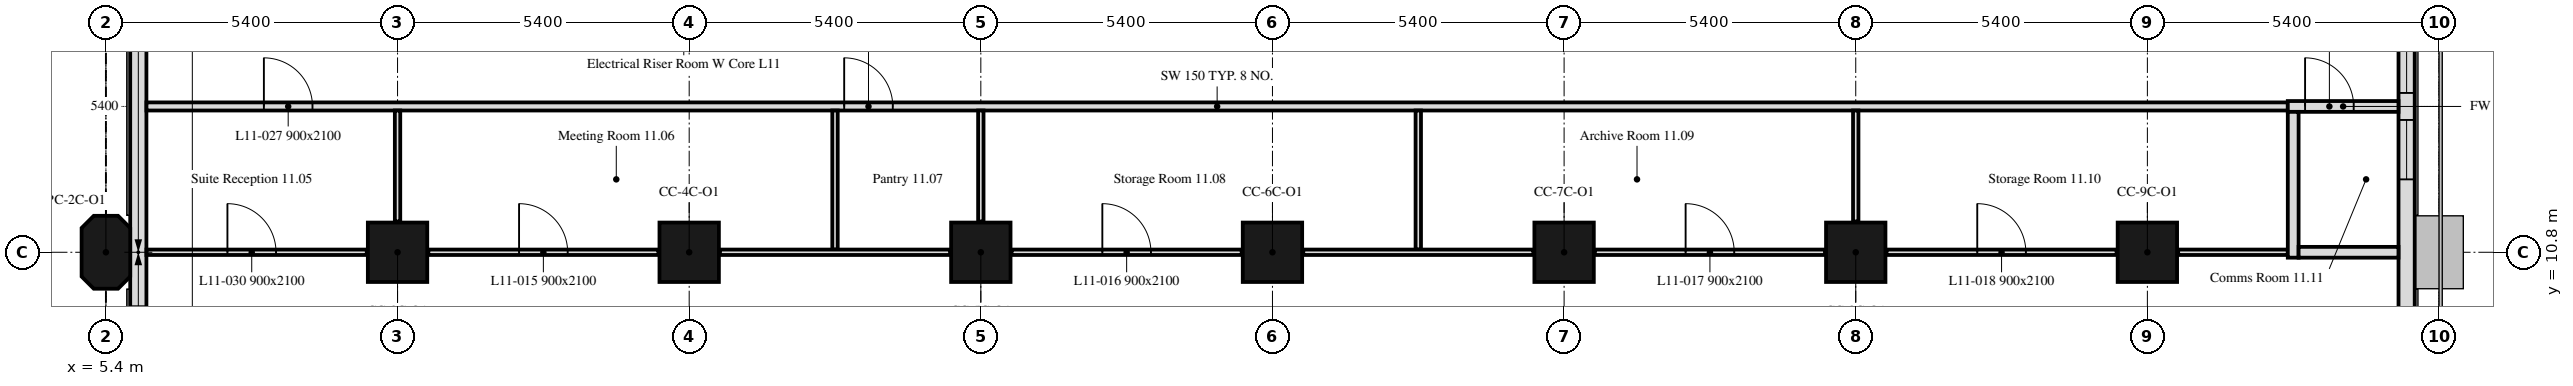
"""IFC4 building model, lengths in metres.
Left out: names, types, materials, properties, quantities, classifications, styles, units other than length and angle.
Written with IfcOpenShell. Run it as: python <this file> out.ifc"""

import sys

from ifc_helpers import new_model, si_unit, direction, frame, frame_2d, origin, origin_2d, place, context, subcontext, project, spatial, polyline, rectangle, outline, extrude, element, fill, save


model = new_model("IFC4")
c1 = context("Model", 3, precision=1e-05, world=origin(), true_north=direction((0.0, 1.0)))
c2 = subcontext(c1, "Body", "Model", "MODEL_VIEW")
j1 = project(units=[si_unit("LENGTHUNIT", "METRE"), si_unit("PLANEANGLEUNIT", "RADIAN")], contexts=[c1])
p1 = place(None, origin())
s1 = spatial("IfcSite", under=j1, at=p1, CompositionType="ELEMENT")
p2 = place(p1, origin())
s2 = spatial("IfcBuilding", under=s1, at=p2, CompositionType="ELEMENT")
p3 = place(p2, frame((0.0, 0.0, 52.6)))
s3 = spatial("IfcBuildingStorey", under=s2, at=p3, CompositionType="ELEMENT", Elevation=52.6)
p4 = place(p3, frame((5.4, 10.8, 0.0), z_axis=(0.0, 0.0, 1.0), x_axis=(0.0, 1.0, 0.0)))
e1 = element("IfcColumn", 1, at=p4, inside=s3, PredefinedType="COLUMN", context=c2, shape_type="SweptSolid", body=[
    extrude(outline(polyline([(-0.45, -0.45), (0.45, -0.45), (0.675, -0.225), (0.675, 0.225), (0.45, 0.45), (-0.45, 0.45), (-0.675, 0.225), (-0.675, -0.225), (-0.45, -0.45)])), origin(), (0.0, 0.0, 1.0), 3.5),
])
for number, where, z_axis, x_axis in (
    (2, (10.8, 10.8, 0.0), (0.0, 0.0, 1.0), (1.0, 0.0, 0.0)),
    (3, (16.2, 10.8, 0.0), (0.0, 0.0, 1.0), (1.0, 0.0, 0.0)),
    (4, (21.6, 10.8, 0.0), (0.0, 0.0, 1.0), (1.0, 0.0, 0.0)),
    (5, (27.0, 10.8, 0.0), (0.0, 0.0, 1.0), (1.0, 0.0, 0.0)),
    (6, (32.4, 10.8, 0.0), (0.0, 0.0, 1.0), (1.0, 0.0, 0.0)),
    (7, (37.8, 10.8, 0.0), (0.0, 0.0, 1.0), (1.0, 0.0, 0.0)),
    (8, (43.2, 10.8, 0.0), (0.0, 0.0, 1.0), (1.0, 0.0, 0.0)),
):
    element("IfcColumn", number, at=place(p3, frame(where, z_axis=z_axis, x_axis=x_axis)), inside=s3, PredefinedType="COLUMN", context=c2, shape_type="SweptSolid", body=[
        extrude(rectangle(XDim=1.1, YDim=1.1, at=origin_2d()), origin(), (0.0, 0.0, 1.0), 3.5),
    ])
p5 = place(p3, frame((48.0, 5.586, 0.0), z_axis=(0.0, 0.0, 1.0), x_axis=(0.0, 1.0, 0.0)))
e9 = element("IfcWall", 9, at=p5, inside=s3, PredefinedType="SOLIDWALL", context=c2, shape_type="SweptSolid", body=[
    extrude(rectangle(XDim=32.027, YDim=0.3, at=frame_2d((16.014, 0.0))), origin(), (0.0, 0.0, 1.0), 3.5),
])
p6 = place(p5, frame((6.564, 0.0, 0.9)))
e10 = element("IfcOpeningElement", 10, at=p6, cuts=e9, PredefinedType="OPENING", context=c2, shape_type="SweptSolid", body=[
    extrude(rectangle(XDim=1.1, YDim=1.7, at=frame_2d((0.55, 0.85))), frame((0.0, 0.16, 0.0), z_axis=(0.0, -1.0, 0.0), x_axis=(1.0, 0.0, 0.0)), (0.0, 0.0, 1.0), 0.32),
])
p7 = place(p5, frame((8.164, 0.0, 0.9)))
e11 = element("IfcOpeningElement", 11, at=p7, cuts=e9, PredefinedType="OPENING", context=c2, shape_type="SweptSolid", body=[
    extrude(rectangle(XDim=1.1, YDim=1.7, at=frame_2d((0.55, 0.85))), frame((0.0, 0.16, 0.0), z_axis=(0.0, -1.0, 0.0), x_axis=(1.0, 0.0, 0.0)), (0.0, 0.0, 1.0), 0.32),
])
p8 = place(p5, frame((17.014, 0.0, 0.9)))
e12 = element("IfcOpeningElement", 12, at=p8, cuts=e9, PredefinedType="OPENING", context=c2, shape_type="SweptSolid", body=[
    extrude(rectangle(XDim=3.4, YDim=1.7, at=frame_2d((1.7, 0.85))), frame((0.0, 0.16, 0.0), z_axis=(0.0, -1.0, 0.0), x_axis=(1.0, 0.0, 0.0)), (0.0, 0.0, 1.0), 0.32),
])
p9 = place(p5, frame((28.164, 0.0, 0.9)))
e13 = element("IfcOpeningElement", 13, at=p9, cuts=e9, PredefinedType="OPENING", context=c2, shape_type="SweptSolid", body=[
    extrude(rectangle(XDim=1.1, YDim=1.7, at=frame_2d((0.55, 0.85))), frame((0.0, 0.16, 0.0), z_axis=(0.0, -1.0, 0.0), x_axis=(1.0, 0.0, 0.0)), (0.0, 0.0, 1.0), 0.32),
])
p10 = place(p5, frame((29.764, 0.0, 0.9)))
e14 = element("IfcOpeningElement", 14, at=p10, cuts=e9, PredefinedType="OPENING", context=c2, shape_type="SweptSolid", body=[
    extrude(rectangle(XDim=1.1, YDim=1.7, at=frame_2d((0.55, 0.85))), frame((0.0, 0.16, 0.0), z_axis=(0.0, -1.0, 0.0), x_axis=(1.0, 0.0, 0.0)), (0.0, 0.0, 1.0), 0.32),
])
p11 = place(p3, frame((6.0, 16.2, 0.0), z_axis=(0.0, 0.0, 1.0), x_axis=(0.0, -1.0, 0.0)))
e15 = element("IfcWall", 15, at=p11, inside=s3, PredefinedType="SOLIDWALL", context=c2, shape_type="SweptSolid", body=[
    extrude(rectangle(XDim=10.614, YDim=0.3, at=frame_2d((5.307, 0.0))), origin(), (0.0, 0.0, 1.0), 3.5),
])
p12 = place(p11, frame((6.4, 0.0, 0.9)))
e16 = element("IfcOpeningElement", 16, at=p12, cuts=e15, PredefinedType="OPENING", context=c2, shape_type="SweptSolid", body=[
    extrude(rectangle(XDim=3.4, YDim=1.7, at=frame_2d((1.7, 0.85))), frame((0.0, 0.16, 0.0), z_axis=(0.0, -1.0, 0.0), x_axis=(1.0, 0.0, 0.0)), (0.0, 0.0, 1.0), 0.32),
])
p13 = place(p3, frame((6.151, 13.5, 0.0), z_axis=(0.0, 0.0, 1.0), x_axis=(1.0, 0.0, 0.0)))
e17 = element("IfcWall", 17, at=p13, inside=s3, PredefinedType="PARTITIONING", context=c2, shape_type="SweptSolid", body=[
    extrude(rectangle(XDim=39.649, YDim=0.15, at=frame_2d((19.825, 0.0))), origin(), (0.0, 0.0, 1.0), 2.75),
])
p14 = place(p13, frame((12.919, 0.0, 0.0)))
e18 = element("IfcOpeningElement", 18, at=p14, cuts=e17, PredefinedType="OPENING", context=c2, shape_type="SweptSolid", body=[
    extrude(rectangle(XDim=0.9, YDim=2.1, at=frame_2d((0.45, 1.05))), frame((0.0, 0.075, 0.0), z_axis=(0.0, -1.0, 0.0), x_axis=(1.0, 0.0, 0.0)), (0.0, 0.0, 1.0), 0.15),
])
p15 = place(p13, frame((2.174, 0.0, 0.0)))
e19 = element("IfcOpeningElement", 19, at=p15, cuts=e17, PredefinedType="OPENING", context=c2, shape_type="SweptSolid", body=[
    extrude(rectangle(XDim=0.9, YDim=2.1, at=frame_2d((0.45, 1.05))), frame((0.0, 0.075, 0.0), z_axis=(0.0, -1.0, 0.0), x_axis=(1.0, 0.0, 0.0)), (0.0, 0.0, 1.0), 0.15),
])
p16 = place(p3, frame((45.8, 13.5, 0.0), z_axis=(0.0, 0.0, 1.0), x_axis=(1.0, 0.0, 0.0)))
e20 = element("IfcWall", 20, at=p16, inside=s3, PredefinedType="PARTITIONING", context=c2, shape_type="SweptSolid", body=[
    extrude(rectangle(XDim=2.049, YDim=0.2, at=frame_2d((1.024, 0.0))), origin(), (0.0, 0.0, 1.0), 3.5),
])
p17 = place(p16, frame((0.32, 0.0, 0.0)))
e21 = element("IfcOpeningElement", 21, at=p17, cuts=e20, PredefinedType="OPENING", context=c2, shape_type="SweptSolid", body=[
    extrude(rectangle(XDim=0.9, YDim=2.1, at=frame_2d((0.45, 1.05))), frame((0.0, 0.1, 0.0), z_axis=(0.0, -1.0, 0.0), x_axis=(1.0, 0.0, 0.0)), (0.0, 0.0, 1.0), 0.2),
])
p18 = place(p3, frame((6.151, 10.8, 0.0), z_axis=(0.0, 0.0, 1.0), x_axis=(1.0, 0.0, 0.0)))
e22 = element("IfcWall", 22, at=p18, inside=s3, PredefinedType="PARTITIONING", context=c2, shape_type="SweptSolid", body=[
    extrude(rectangle(XDim=4.079, YDim=0.1, at=frame_2d((2.04, 0.0))), origin(), (0.0, 0.0, 1.0), 3.5),
])
p19 = place(p18, frame((1.499, 0.0, 0.0)))
e23 = element("IfcOpeningElement", 23, at=p19, cuts=e22, PredefinedType="OPENING", context=c2, shape_type="SweptSolid", body=[
    extrude(rectangle(XDim=0.9, YDim=2.1, at=frame_2d((0.45, 1.05))), frame((0.0, 0.05, 0.0), z_axis=(0.0, -1.0, 0.0), x_axis=(1.0, 0.0, 0.0)), (0.0, 0.0, 1.0), 0.1),
])
p20 = place(p3, frame((10.8, 11.37, 0.0), z_axis=(0.0, 0.0, 1.0), x_axis=(0.0, 1.0, 0.0)))
e24 = element("IfcWall", 24, at=p20, inside=s3, PredefinedType="PARTITIONING", context=c2, shape_type="SweptSolid", body=[
    extrude(rectangle(XDim=2.055, YDim=0.1, at=frame_2d((1.027, 0.0))), origin(), (0.0, 0.0, 1.0), 3.5),
])
p21 = place(p3, frame((11.37, 10.8, 0.0), z_axis=(0.0, 0.0, 1.0), x_axis=(1.0, 0.0, 0.0)))
e25 = element("IfcWall", 25, at=p21, inside=s3, PredefinedType="PARTITIONING", context=c2, shape_type="SweptSolid", body=[
    extrude(rectangle(XDim=4.26, YDim=0.1, at=frame_2d((2.13, 0.0))), origin(), (0.0, 0.0, 1.0), 3.5),
])
p22 = place(p21, frame((1.68, 0.0, 0.0)))
e26 = element("IfcOpeningElement", 26, at=p22, cuts=e25, PredefinedType="OPENING", context=c2, shape_type="SweptSolid", body=[
    extrude(rectangle(XDim=0.9, YDim=2.1, at=frame_2d((0.45, 1.05))), frame((0.0, 0.05, 0.0), z_axis=(0.0, -1.0, 0.0), x_axis=(1.0, 0.0, 0.0)), (0.0, 0.0, 1.0), 0.1),
])
p23 = place(p3, frame((18.9, 10.85, 0.0), z_axis=(0.0, 0.0, 1.0), x_axis=(0.0, 1.0, 0.0)))
e27 = element("IfcWall", 27, at=p23, inside=s3, PredefinedType="PARTITIONING", context=c2, shape_type="SweptSolid", body=[
    extrude(rectangle(XDim=2.575, YDim=0.1, at=frame_2d((1.288, 0.0))), origin(), (0.0, 0.0, 1.0), 3.5),
])
p24 = place(p3, frame((16.77, 10.8, 0.0), z_axis=(0.0, 0.0, 1.0), x_axis=(1.0, 0.0, 0.0)))
e28 = element("IfcWall", 28, at=p24, inside=s3, PredefinedType="PARTITIONING", context=c2, shape_type="SweptSolid", body=[
    extrude(rectangle(XDim=4.26, YDim=0.1, at=frame_2d((2.13, 0.0))), origin(), (0.0, 0.0, 1.0), 3.5),
])
p25 = place(p3, frame((21.6, 11.37, 0.0), z_axis=(0.0, 0.0, 1.0), x_axis=(0.0, 1.0, 0.0)))
e29 = element("IfcWall", 29, at=p25, inside=s3, PredefinedType="PARTITIONING", context=c2, shape_type="SweptSolid", body=[
    extrude(rectangle(XDim=2.055, YDim=0.1, at=frame_2d((1.027, 0.0))), origin(), (0.0, 0.0, 1.0), 2.75),
])
p26 = place(p3, frame((22.17, 10.8, 0.0), z_axis=(0.0, 0.0, 1.0), x_axis=(1.0, 0.0, 0.0)))
e30 = element("IfcWall", 30, at=p26, inside=s3, PredefinedType="PARTITIONING", context=c2, shape_type="SweptSolid", body=[
    extrude(rectangle(XDim=4.26, YDim=0.1, at=frame_2d((2.13, 0.0))), origin(), (0.0, 0.0, 1.0), 3.5),
])
p27 = place(p26, frame((1.68, 0.0, 0.0)))
e31 = element("IfcOpeningElement", 31, at=p27, cuts=e30, PredefinedType="OPENING", context=c2, shape_type="SweptSolid", body=[
    extrude(rectangle(XDim=0.9, YDim=2.1, at=frame_2d((0.45, 1.05))), frame((0.0, 0.05, 0.0), z_axis=(0.0, -1.0, 0.0), x_axis=(1.0, 0.0, 0.0)), (0.0, 0.0, 1.0), 0.1),
])
p28 = place(p3, frame((29.7, 10.85, 0.0), z_axis=(0.0, 0.0, 1.0), x_axis=(0.0, 1.0, 0.0)))
e32 = element("IfcWall", 32, at=p28, inside=s3, PredefinedType="PARTITIONING", context=c2, shape_type="SweptSolid", body=[
    extrude(rectangle(XDim=2.575, YDim=0.1, at=frame_2d((1.288, 0.0))), origin(), (0.0, 0.0, 1.0), 3.5),
])
p29 = place(p3, frame((27.57, 10.8, 0.0), z_axis=(0.0, 0.0, 1.0), x_axis=(1.0, 0.0, 0.0)))
e33 = element("IfcWall", 33, at=p29, inside=s3, PredefinedType="PARTITIONING", context=c2, shape_type="SweptSolid", body=[
    extrude(rectangle(XDim=4.26, YDim=0.1, at=frame_2d((2.13, 0.0))), origin(), (0.0, 0.0, 1.0), 3.5),
])
p30 = place(p3, frame((32.97, 10.8, 0.0), z_axis=(0.0, 0.0, 1.0), x_axis=(1.0, 0.0, 0.0)))
e34 = element("IfcWall", 34, at=p30, inside=s3, PredefinedType="PARTITIONING", context=c2, shape_type="SweptSolid", body=[
    extrude(rectangle(XDim=4.26, YDim=0.1, at=frame_2d((2.13, 0.0))), origin(), (0.0, 0.0, 1.0), 2.75),
])
p31 = place(p30, frame((1.68, 0.0, 0.0)))
e35 = element("IfcOpeningElement", 35, at=p31, cuts=e34, PredefinedType="OPENING", context=c2, shape_type="SweptSolid", body=[
    extrude(rectangle(XDim=0.9, YDim=2.1, at=frame_2d((0.45, 1.05))), frame((0.0, 0.05, 0.0), z_axis=(0.0, -1.0, 0.0), x_axis=(1.0, 0.0, 0.0)), (0.0, 0.0, 1.0), 0.1),
])
p32 = place(p3, frame((37.8, 11.37, 0.0), z_axis=(0.0, 0.0, 1.0), x_axis=(0.0, 1.0, 0.0)))
e36 = element("IfcWall", 36, at=p32, inside=s3, PredefinedType="PARTITIONING", context=c2, shape_type="SweptSolid", body=[
    extrude(rectangle(XDim=2.055, YDim=0.1, at=frame_2d((1.027, 0.0))), origin(), (0.0, 0.0, 1.0), 2.75),
])
p33 = place(p3, frame((38.37, 10.8, 0.0), z_axis=(0.0, 0.0, 1.0), x_axis=(1.0, 0.0, 0.0)))
e37 = element("IfcWall", 37, at=p33, inside=s3, PredefinedType="PARTITIONING", context=c2, shape_type="SweptSolid", body=[
    extrude(rectangle(XDim=4.26, YDim=0.1, at=frame_2d((2.13, 0.0))), origin(), (0.0, 0.0, 1.0), 2.75),
])
p34 = place(p33, frame((1.68, 0.0, 0.0)))
e38 = element("IfcOpeningElement", 38, at=p34, cuts=e37, PredefinedType="OPENING", context=c2, shape_type="SweptSolid", body=[
    extrude(rectangle(XDim=0.9, YDim=2.1, at=frame_2d((0.45, 1.05))), frame((0.0, 0.05, 0.0), z_axis=(0.0, -1.0, 0.0), x_axis=(1.0, 0.0, 0.0)), (0.0, 0.0, 1.0), 0.1),
])
p35 = place(p3, frame((43.77, 10.8, 0.0), z_axis=(0.0, 0.0, 1.0), x_axis=(1.0, 0.0, 0.0)))
e39 = element("IfcWall", 39, at=p35, inside=s3, PredefinedType="PARTITIONING", context=c2, shape_type="SweptSolid", body=[
    extrude(rectangle(XDim=2.03, YDim=0.1, at=frame_2d((1.015, 0.0))), origin(), (0.0, 0.0, 1.0), 2.75),
])
p36 = place(p3, frame((45.9, 10.7, 0.0), z_axis=(0.0, 0.0, 1.0), x_axis=(0.0, 1.0, 0.0)))
e40 = element("IfcWall", 40, at=p36, inside=s3, PredefinedType="PARTITIONING", context=c2, shape_type="SweptSolid", body=[
    extrude(rectangle(XDim=2.7, YDim=0.2, at=frame_2d((1.35, 0.0))), origin(), (0.0, 0.0, 1.0), 2.75),
])
p37 = place(p3, frame((46.0, 10.8, 0.0), z_axis=(0.0, 0.0, 1.0), x_axis=(1.0, 0.0, 0.0)))
e41 = element("IfcWall", 41, at=p37, inside=s3, PredefinedType="PARTITIONING", context=c2, shape_type="SweptSolid", body=[
    extrude(rectangle(XDim=1.849, YDim=0.2, at=frame_2d((0.925, 0.0))), origin(), (0.0, 0.0, 1.0), 2.75),
])
p38 = place(p6, origin())
e42 = element("IfcWindow", 42, at=p38, inside=s3, PartitioningType="SINGLE_PANEL", PredefinedType="WINDOW", context=c2, shape_type="SweptSolid", body=[
    extrude(rectangle(XDim=1.1, YDim=1.7, at=frame_2d((0.55, 0.85))), frame((0.0, 0.03, 0.0), z_axis=(0.0, -1.0, 0.0), x_axis=(1.0, 0.0, 0.0)), (0.0, 0.0, 1.0), 0.06),
])
fill(e10, e42)
p39 = place(p7, origin())
e43 = element("IfcWindow", 43, at=p39, inside=s3, PartitioningType="SINGLE_PANEL", PredefinedType="WINDOW", context=c2, shape_type="SweptSolid", body=[
    extrude(rectangle(XDim=1.1, YDim=1.7, at=frame_2d((0.55, 0.85))), frame((0.0, 0.03, 0.0), z_axis=(0.0, -1.0, 0.0), x_axis=(1.0, 0.0, 0.0)), (0.0, 0.0, 1.0), 0.06),
])
fill(e11, e43)
p40 = place(p14, origin())
e44 = element("IfcDoor", 44, at=p40, inside=s3, OperationType="SINGLE_SWING_LEFT", PredefinedType="DOOR", context=c2, shape_type="SweptSolid", body=[
    extrude(rectangle(XDim=0.9, YDim=2.1, at=frame_2d((0.45, 1.05))), frame((0.0, 0.025, 0.0), z_axis=(0.0, -1.0, 0.0), x_axis=(1.0, 0.0, 0.0)), (0.0, 0.0, 1.0), 0.05),
])
fill(e18, e44)
p41 = place(p17, origin())
e45 = element("IfcDoor", 45, at=p41, inside=s3, OperationType="SINGLE_SWING_RIGHT", PredefinedType="DOOR", context=c2, shape_type="SweptSolid", body=[
    extrude(rectangle(XDim=0.9, YDim=2.1, at=frame_2d((0.45, 1.05))), frame((0.0, 0.025, 0.0), z_axis=(0.0, -1.0, 0.0), x_axis=(1.0, 0.0, 0.0)), (0.0, 0.0, 1.0), 0.05),
])
fill(e21, e45)
p42 = place(p22, origin())
e46 = element("IfcDoor", 46, at=p42, inside=s3, OperationType="SINGLE_SWING_RIGHT", PredefinedType="DOOR", context=c2, shape_type="SweptSolid", body=[
    extrude(rectangle(XDim=0.9, YDim=2.1, at=frame_2d((0.45, 1.05))), frame((0.0, 0.025, 0.0), z_axis=(0.0, -1.0, 0.0), x_axis=(1.0, 0.0, 0.0)), (0.0, 0.0, 1.0), 0.05),
])
fill(e26, e46)
p43 = place(p27, origin())
e47 = element("IfcDoor", 47, at=p43, inside=s3, OperationType="SINGLE_SWING_LEFT", PredefinedType="DOOR", context=c2, shape_type="SweptSolid", body=[
    extrude(rectangle(XDim=0.9, YDim=2.1, at=frame_2d((0.45, 1.05))), frame((0.0, 0.025, 0.0), z_axis=(0.0, -1.0, 0.0), x_axis=(1.0, 0.0, 0.0)), (0.0, 0.0, 1.0), 0.05),
])
fill(e31, e47)
p44 = place(p31, origin())
e48 = element("IfcDoor", 48, at=p44, inside=s3, OperationType="SINGLE_SWING_RIGHT", PredefinedType="DOOR", context=c2, shape_type="SweptSolid", body=[
    extrude(rectangle(XDim=0.9, YDim=2.1, at=frame_2d((0.45, 1.05))), frame((0.0, 0.025, 0.0), z_axis=(0.0, -1.0, 0.0), x_axis=(1.0, 0.0, 0.0)), (0.0, 0.0, 1.0), 0.05),
])
fill(e35, e48)
p45 = place(p34, origin())
e49 = element("IfcDoor", 49, at=p45, inside=s3, OperationType="SINGLE_SWING_LEFT", PredefinedType="DOOR", context=c2, shape_type="SweptSolid", body=[
    extrude(rectangle(XDim=0.9, YDim=2.1, at=frame_2d((0.45, 1.05))), frame((0.0, 0.025, 0.0), z_axis=(0.0, -1.0, 0.0), x_axis=(1.0, 0.0, 0.0)), (0.0, 0.0, 1.0), 0.05),
])
fill(e38, e49)
p46 = place(p15, origin())
e50 = element("IfcDoor", 50, at=p46, inside=s3, OperationType="SINGLE_SWING_LEFT", PredefinedType="DOOR", context=c2, shape_type="SweptSolid", body=[
    extrude(rectangle(XDim=0.9, YDim=2.1, at=frame_2d((0.45, 1.05))), frame((0.0, 0.025, 0.0), z_axis=(0.0, -1.0, 0.0), x_axis=(1.0, 0.0, 0.0)), (0.0, 0.0, 1.0), 0.05),
])
fill(e19, e50)
p47 = place(p19, origin())
e51 = element("IfcDoor", 51, at=p47, inside=s3, OperationType="SINGLE_SWING_LEFT", PredefinedType="DOOR", context=c2, shape_type="SweptSolid", body=[
    extrude(rectangle(XDim=0.9, YDim=2.1, at=frame_2d((0.45, 1.05))), frame((0.0, 0.025, 0.0), z_axis=(0.0, -1.0, 0.0), x_axis=(1.0, 0.0, 0.0)), (0.0, 0.0, 1.0), 0.05),
])
fill(e23, e51)
save(model, sys.argv[1])
